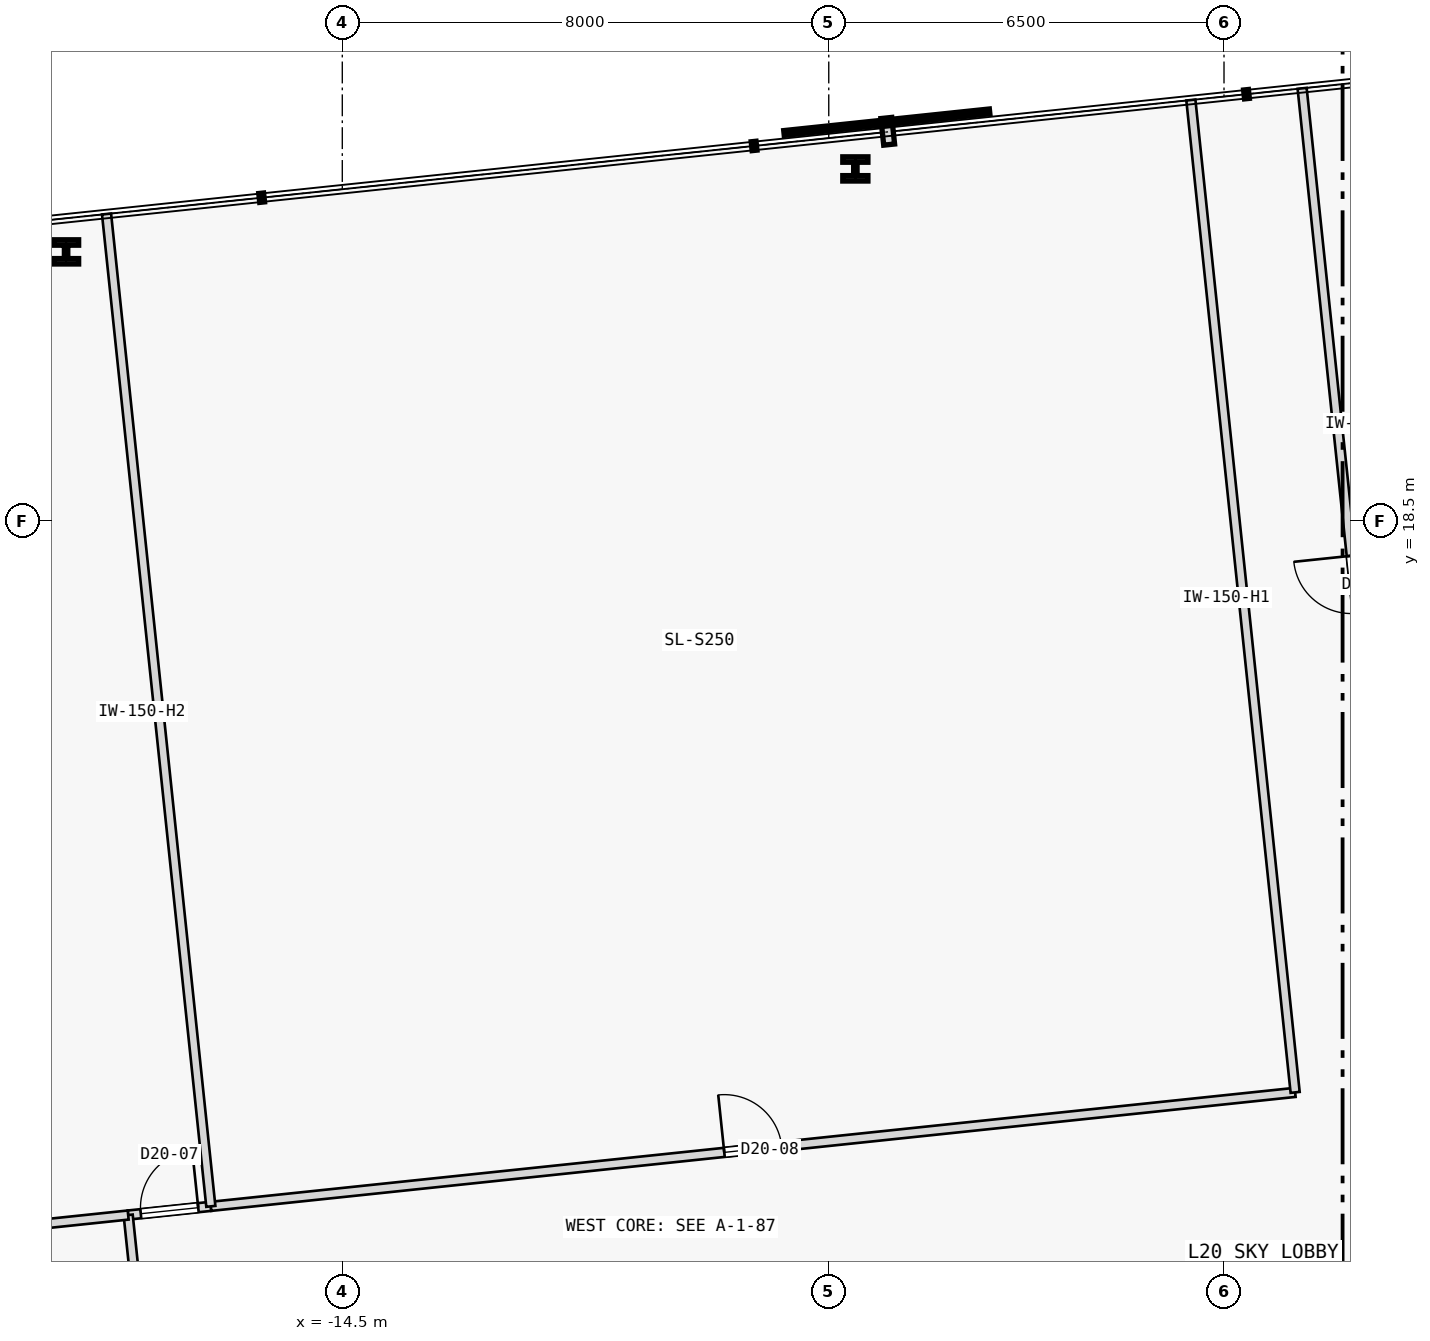
"""IFC4 building model, lengths in metres.
Left out: names, types, materials, properties, quantities, classifications, styles, units other than length and angle.
Written with IfcOpenShell. Run it as: python <this file> out.ifc"""

import sys

from ifc_helpers import new_model, si_unit, direction, frame, frame_2d, origin, origin_2d, place, context, subcontext, project, spatial, rectangle, i_section, extrude, element, fill, save


model = new_model("IFC4")
c1 = context("Model", 3, precision=1e-05, world=origin(), true_north=direction((0.0, 1.0)))
c2 = subcontext(c1, "Body", "Model", "MODEL_VIEW")
j1 = project(units=[si_unit("LENGTHUNIT", "METRE"), si_unit("PLANEANGLEUNIT", "RADIAN")], contexts=[c1])
p1 = place(None, origin())
s1 = spatial("IfcSite", under=j1, at=p1, CompositionType="ELEMENT")
p2 = place(p1, origin())
s2 = spatial("IfcBuilding", under=s1, at=p2, CompositionType="ELEMENT")
p3 = place(p2, frame((0.0, 0.0, 83.2)))
s3 = spatial("IfcBuildingStorey", under=s2, at=p3, CompositionType="ELEMENT", Elevation=83.2)
for number, where, z_axis, x_axis in (
    (1, (-6.062, 24.293, 0.0), (0.0, 0.0, 1.0), (1.0, 0.0, 0.0)),
    (2, (-19.042, 22.929, 0.0), (0.0, 0.0, 1.0), (1.0, 0.0, 0.0)),
):
    element("IfcColumn", number, at=place(p3, frame(where, z_axis=z_axis, x_axis=x_axis)), inside=s3, PredefinedType="COLUMN", context=c2, shape_type="SweptSolid", body=[
        extrude(i_section(OverallWidth=0.413, OverallDepth=0.398, WebThickness=0.056, FlangeThickness=0.089, FilletRadius=0.015, at=origin_2d()), origin(), (0.0, 0.0, 1.0), 4.2),
    ])
p4 = place(p3, frame((-18.021, 7.09, 0.0), z_axis=(0.0, 0.0, 1.0), x_axis=(0.994525986665, 0.104489529849, 0.0)))
e3 = element("IfcWall", 3, at=p4, inside=s3, PredefinedType="PARTITIONING", context=c2, shape_type="SweptSolid", body=[
    extrude(rectangle(XDim=1.367, YDim=0.15, at=frame_2d((0.684, 0.0))), origin(), (0.0, 0.0, 1.0), 3.975),
])
p5 = place(p4, frame((0.208, 0.0, 0.0)))
e4 = element("IfcOpeningElement", 4, at=p5, cuts=e3, PredefinedType="OPENING", context=c2, shape_type="SweptSolid", body=[
    extrude(rectangle(XDim=0.95, YDim=2.15, at=frame_2d((0.475, 1.075))), frame((0.0, 0.085, 0.0), z_axis=(0.0, -1.0, 0.0), x_axis=(1.0, 0.0, 0.0)), (0.0, 0.0, 1.0), 0.17),
])
p6 = place(p3, frame((-16.662, 7.233, 0.0), z_axis=(0.0, 0.0, 1.0), x_axis=(0.994521482375, 0.10453239256, 0.0)))
e5 = element("IfcWall", 5, at=p6, inside=s3, PredefinedType="PARTITIONING", context=c2, shape_type="SweptSolid", body=[
    extrude(rectangle(XDim=17.93, YDim=0.15, at=frame_2d((8.965, 0.0))), origin(), (0.0, 0.0, 1.0), 3.975),
])
p7 = place(p6, frame((8.49, 0.0, 0.0)))
e6 = element("IfcOpeningElement", 6, at=p7, cuts=e5, PredefinedType="OPENING", context=c2, shape_type="SweptSolid", body=[
    extrude(rectangle(XDim=0.95, YDim=2.15, at=frame_2d((0.475, 1.075))), frame((0.0, 0.085, 0.0), z_axis=(0.0, -1.0, 0.0), x_axis=(1.0, 0.0, 0.0)), (0.0, 0.0, 1.0), 0.17),
])
p8 = place(p3, frame((1.17, 9.107, 0.0), z_axis=(0.0, 0.0, 1.0), x_axis=(-0.104521364336, 0.99452264147, 0.0)))
e7 = element("IfcWall", 7, at=p8, inside=s3, PredefinedType="PARTITIONING", context=c2, shape_type="SweptSolid", body=[
    extrude(rectangle(XDim=16.409, YDim=0.15, at=frame_2d((8.205, 0.0))), origin(), (0.0, 0.0, 1.0), 3.525),
])
p9 = place(p3, frame((3.0, 9.3, 0.0), z_axis=(0.0, 0.0, 1.0), x_axis=(-0.104536080245, 0.994521094762, 0.0)))
e8 = element("IfcWall", 8, at=p9, inside=s3, PredefinedType="PARTITIONING", context=c2, shape_type="SweptSolid", body=[
    extrude(rectangle(XDim=16.409, YDim=0.15, at=frame_2d((8.205, 0.0))), origin(), (0.0, 0.0, 1.0), 3.975),
])
p10 = place(p9, frame((7.729, 0.0, 0.0)))
e9 = element("IfcOpeningElement", 9, at=p10, cuts=e8, PredefinedType="OPENING", context=c2, shape_type="SweptSolid", body=[
    extrude(rectangle(XDim=0.95, YDim=2.15, at=frame_2d((0.475, 1.075))), frame((0.0, 0.085, 0.0), z_axis=(0.0, -1.0, 0.0), x_axis=(1.0, 0.0, 0.0)), (0.0, 0.0, 1.0), 0.17),
])
p11 = place(p3, frame((-17.402, 1.202, 0.0), z_axis=(0.0, 0.0, 1.0), x_axis=(-0.104523807841, 0.994522384662, 0.0)))
e10 = element("IfcWall", 10, at=p11, inside=s3, PredefinedType="PARTITIONING", context=c2, shape_type="SweptSolid", body=[
    extrude(rectangle(XDim=5.921, YDim=0.15, at=frame_2d((2.96, 0.0))), origin(), (0.0, 0.0, 1.0), 3.975),
])
p12 = place(p3, frame((-16.662, 7.233, 0.0), z_axis=(0.0, 0.0, 1.0), x_axis=(-0.104521364336, 0.99452264147, 0.0)))
e11 = element("IfcWall", 11, at=p12, inside=s3, PredefinedType="PARTITIONING", context=c2, shape_type="SweptSolid", body=[
    extrude(rectangle(XDim=16.409, YDim=0.15, at=frame_2d((8.205, 0.0))), origin(), (0.0, 0.0, 1.0), 3.375),
])
p13 = place(p3, frame((-33.967, 5.414, 0.0), z_axis=(0.0, 0.0, 1.0), x_axis=(0.994521211213, 0.104534972363, 0.0)))
e12 = element("IfcWall", 12, at=p13, inside=s3, PredefinedType="PARTITIONING", context=c2, shape_type="SweptSolid", body=[
    extrude(rectangle(XDim=16.033, YDim=0.15, at=frame_2d((8.017, 0.0))), origin(), (0.0, 0.0, 1.0), 3.975),
])
p14 = place(p5, origin())
e13 = element("IfcDoor", 13, at=p14, inside=s3, OperationType="SINGLE_SWING_RIGHT", PredefinedType="DOOR", context=c2, shape_type="SweptSolid", body=[
    extrude(rectangle(XDim=0.95, YDim=2.15, at=frame_2d((0.475, 1.075))), frame((0.0, 0.025, 0.0), z_axis=(0.0, -1.0, 0.0), x_axis=(1.0, 0.0, 0.0)), (0.0, 0.0, 1.0), 0.05),
])
fill(e4, e13)
p15 = place(p7, origin())
e14 = element("IfcDoor", 14, at=p15, inside=s3, OperationType="SINGLE_SWING_LEFT", PredefinedType="DOOR", context=c2, shape_type="SweptSolid", body=[
    extrude(rectangle(XDim=0.95, YDim=2.15, at=frame_2d((0.475, 1.075))), frame((0.0, 0.025, 0.0), z_axis=(0.0, -1.0, 0.0), x_axis=(1.0, 0.0, 0.0)), (0.0, 0.0, 1.0), 0.05),
])
fill(e6, e14)
p16 = place(p10, origin())
e15 = element("IfcDoor", 15, at=p16, inside=s3, OperationType="SINGLE_SWING_RIGHT", PredefinedType="DOOR", context=c2, shape_type="SweptSolid", body=[
    extrude(rectangle(XDim=0.95, YDim=2.15, at=frame_2d((0.475, 1.075))), frame((0.0, 0.025, 0.0), z_axis=(0.0, -1.0, 0.0), x_axis=(1.0, 0.0, 0.0)), (0.0, 0.0, 1.0), 0.05),
])
fill(e9, e15)
save(model, sys.argv[1])
